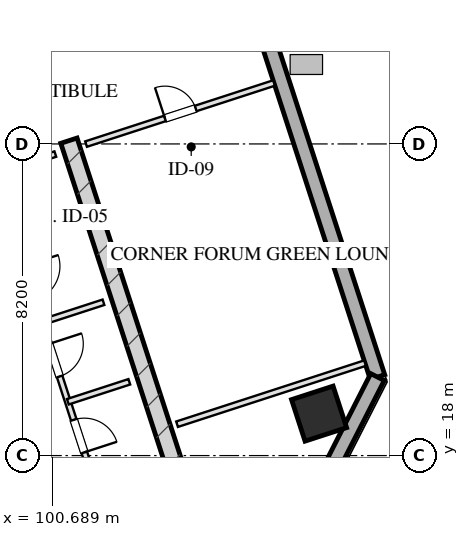
"""IFC4 building model, lengths in metres.
Left out: names, types, materials, properties, quantities, classifications, styles, units other than length and angle.
Written with IfcOpenShell. Run it as: python <this file> out.ifc"""

import sys

from ifc_helpers import new_model, si_unit, direction, frame, frame_2d, origin, origin_2d, place, context, subcontext, project, spatial, rectangle, hollow_rectangle, extrude, element, fill, save


model = new_model("IFC4")
c1 = context("Model", 3, precision=1e-05, world=origin(), true_north=direction((0.0, 1.0)))
c2 = subcontext(c1, "Body", "Model", "MODEL_VIEW")
j1 = project(units=[si_unit("LENGTHUNIT", "METRE"), si_unit("PLANEANGLEUNIT", "RADIAN")], contexts=[c1])
p1 = place(None, origin())
s1 = spatial("IfcSite", under=j1, at=p1, CompositionType="ELEMENT")
p2 = place(p1, origin())
s2 = spatial("IfcBuilding", under=s1, at=p2, CompositionType="ELEMENT")
p3 = place(p2, frame((0.0, 0.0, 205.85)))
s3 = spatial("IfcBuildingStorey", under=s2, at=p3, CompositionType="ELEMENT", Elevation=205.85)
p4 = place(p3, frame((101.128, 26.286, 0.0), z_axis=(0.0, 0.0, 1.0), x_axis=(0.309004419953, -0.951060601881, 0.0)))
e1 = element("IfcWall", 1, at=p4, inside=s3, PredefinedType="SHEAR", context=c2, shape_type="SweptSolid", body=[
    extrude(rectangle(XDim=9.33, YDim=0.45, at=frame_2d((4.665, 0.0))), origin(), (0.0, 0.0, 1.0), 3.45),
])
p5 = place(p3, frame((107.71, 19.104, 0.0), z_axis=(0.0, 0.0, 1.0), x_axis=(0.951056516295, 0.309016994375, 0.0)))
e2 = element("IfcColumn", 2, at=p5, inside=s3, PredefinedType="COLUMN", context=c2, shape_type="SweptSolid", body=[
    extrude(hollow_rectangle(XDim=1.15, YDim=1.15, WallThickness=0.04, at=origin_2d()), origin(), (0.0, 0.0, 1.0), 3.451),
])
p6 = place(p3, frame((97.382, 56.586, 0.0), z_axis=(0.0, 0.0, 1.0), x_axis=(0.309016491071, -0.951056679828, 0.0)))
e3 = element("IfcWall", 3, at=p6, inside=s3, PredefinedType="SOLIDWALL", context=c2, shape_type="SweptSolid", body=[
    extrude(rectangle(XDim=38.4, YDim=0.4, at=frame_2d((19.2, 0.0))), origin(), (0.0, 0.0, 1.0), 2.61),
])
p7 = place(p6, frame((24.55, 0.0, 0.75)))
e4 = element("IfcOpeningElement", 4, at=p7, cuts=e3, PredefinedType="OPENING", context=c2, shape_type="SweptSolid", body=[
    extrude(rectangle(XDim=2.1, YDim=1.46, at=frame_2d((1.05, 0.73))), frame((0.0, 0.21, 0.0), z_axis=(0.0, -1.0, 0.0), x_axis=(1.0, 0.0, 0.0)), (0.0, 0.0, 1.0), 0.42),
])
p8 = place(p6, frame((20.75, 0.0, 0.75)))
e5 = element("IfcOpeningElement", 5, at=p8, cuts=e3, PredefinedType="OPENING", context=c2, shape_type="SweptSolid", body=[
    extrude(rectangle(XDim=2.1, YDim=1.46, at=frame_2d((1.05, 0.73))), frame((0.0, 0.21, 0.0), z_axis=(0.0, -1.0, 0.0), x_axis=(1.0, 0.0, 0.0)), (0.0, 0.0, 1.0), 0.42),
])
p9 = place(p6, frame((16.05, 0.0, 0.0)))
e6 = element("IfcOpeningElement", 6, at=p9, cuts=e3, PredefinedType="OPENING", context=c2, shape_type="SweptSolid", body=[
    extrude(rectangle(XDim=1.1, YDim=2.15, at=frame_2d((0.55, 1.075))), frame((0.0, 0.21, 0.0), z_axis=(0.0, -1.0, 0.0), x_axis=(1.0, 0.0, 0.0)), (0.0, 0.0, 1.0), 0.42),
])
p10 = place(p3, frame((109.248, 20.066, 0.0), z_axis=(0.0, 0.0, 1.0), x_axis=(-0.453949291228, -0.891027519774, 0.0)))
e7 = element("IfcWall", 7, at=p10, inside=s3, PredefinedType="SOLIDWALL", context=c2, shape_type="SweptSolid", body=[
    extrude(rectangle(XDim=3.111, YDim=0.4, at=frame_2d((1.556, 0.0))), origin(), (0.0, 0.0, 1.0), 2.61),
])
p11 = place(p3, frame((97.727, 24.944, 0.0), z_axis=(0.0, 0.0, 1.0), x_axis=(0.951036872128, 0.309077446369, 0.0)))
e8 = element("IfcWall", 8, at=p11, inside=s3, PredefinedType="PARTITIONING", context=c2, shape_type="SweptSolid", body=[
    extrude(rectangle(XDim=3.2, YDim=0.15, at=frame_2d((1.6, 0.0))), origin(), (0.0, 0.0, 1.0), 3.175),
])
p12 = place(p11, frame((0.22, 0.0, 0.0)))
e9 = element("IfcOpeningElement", 9, at=p12, cuts=e8, PredefinedType="OPENING", context=c2, shape_type="SweptSolid", body=[
    extrude(rectangle(XDim=0.95, YDim=2.05, at=frame_2d((0.475, 1.025))), frame((0.0, 0.085, 0.0), z_axis=(0.0, -1.0, 0.0), x_axis=(1.0, 0.0, 0.0)), (0.0, 0.0, 1.0), 0.17),
])
p13 = place(p3, frame((99.153, 25.408, 0.0), z_axis=(0.0, 0.0, 1.0), x_axis=(0.309016001439, -0.951056838919, 0.0)))
e10 = element("IfcWall", 10, at=p13, inside=s3, PredefinedType="PARTITIONING", context=c2, shape_type="SweptSolid", body=[
    extrude(rectangle(XDim=8.43, YDim=0.15, at=frame_2d((4.215, 0.0))), origin(), (0.0, 0.0, 1.0), 3.175),
])
p14 = place(p13, frame((2.55, 0.0, 0.0)))
e11 = element("IfcOpeningElement", 11, at=p14, cuts=e10, PredefinedType="OPENING", context=c2, shape_type="SweptSolid", body=[
    extrude(rectangle(XDim=0.95, YDim=2.05, at=frame_2d((0.475, 1.025))), frame((0.0, 0.085, 0.0), z_axis=(0.0, -1.0, 0.0), x_axis=(1.0, 0.0, 0.0)), (0.0, 0.0, 1.0), 0.17),
])
p15 = place(p13, frame((4.7, 0.0, 0.0)))
e12 = element("IfcOpeningElement", 12, at=p15, cuts=e10, PredefinedType="OPENING", context=c2, shape_type="SweptSolid", body=[
    extrude(rectangle(XDim=0.9, YDim=2.05, at=frame_2d((0.45, 1.025))), frame((0.0, 0.085, 0.0), z_axis=(0.0, -1.0, 0.0), x_axis=(1.0, 0.0, 0.0)), (0.0, 0.0, 1.0), 0.17),
])
p16 = place(p13, frame((6.8, 0.0, 0.0)))
e13 = element("IfcOpeningElement", 13, at=p16, cuts=e10, PredefinedType="OPENING", context=c2, shape_type="SweptSolid", body=[
    extrude(rectangle(XDim=0.9, YDim=2.05, at=frame_2d((0.45, 1.025))), frame((0.0, 0.085, 0.0), z_axis=(0.0, -1.0, 0.0), x_axis=(1.0, 0.0, 0.0)), (0.0, 0.0, 1.0), 0.17),
])
p17 = place(p3, frame((100.42, 21.509, 0.0), z_axis=(0.0, 0.0, 1.0), x_axis=(0.951040401051, 0.309066587596, 0.0)))
e14 = element("IfcWall", 14, at=p17, inside=s3, PredefinedType="PARTITIONING", context=c2, shape_type="SweptSolid", body=[
    extrude(rectangle(XDim=1.7, YDim=0.15, at=frame_2d((0.85, 0.0))), origin(), (0.0, 0.0, 1.0), 3.175),
])
p18 = place(p3, frame((101.1, 19.416, 0.0), z_axis=(0.0, 0.0, 1.0), x_axis=(0.951054116971, 0.309024378638, 0.0)))
e15 = element("IfcWall", 15, at=p18, inside=s3, PredefinedType="PARTITIONING", context=c2, shape_type="SweptSolid", body=[
    extrude(rectangle(XDim=1.7, YDim=0.15, at=frame_2d((0.85, 0.0))), origin(), (0.0, 0.0, 1.0), 3.175),
])
p19 = place(p3, frame((103.973, 18.825, 0.0), z_axis=(0.0, 0.0, 1.0), x_axis=(0.951055112834, 0.309021313752, 0.0)))
e16 = element("IfcWall", 16, at=p19, inside=s3, PredefinedType="PARTITIONING", context=c2, shape_type="SweptSolid", body=[
    extrude(rectangle(XDim=5.2, YDim=0.15, at=frame_2d((2.6, 0.0))), origin(), (0.0, 0.0, 1.0), 3.175),
])
p20 = place(p3, frame((101.578, 26.196, 0.0), z_axis=(0.0, 0.0, 1.0), x_axis=(0.951064427824, 0.308992644131, 0.0)))
e17 = element("IfcWall", 17, at=p20, inside=s3, PredefinedType="PARTITIONING", context=c2, shape_type="SweptSolid", body=[
    extrude(rectangle(XDim=5.2, YDim=0.15, at=frame_2d((2.6, 0.0))), origin(), (0.0, 0.0, 1.0), 3.175),
])
p21 = place(p20, frame((2.184, 0.0, 0.0)))
e18 = element("IfcOpeningElement", 18, at=p21, cuts=e17, PredefinedType="OPENING", context=c2, shape_type="SweptSolid", body=[
    extrude(rectangle(XDim=0.85, YDim=2.05, at=frame_2d((0.425, 1.025))), frame((0.0, 0.085, 0.0), z_axis=(0.0, -1.0, 0.0), x_axis=(1.0, 0.0, 0.0)), (0.0, 0.0, 1.0), 0.17),
])
p22 = place(p15, origin())
e19 = element("IfcDoor", 19, at=p22, inside=s3, OperationType="SINGLE_SWING_LEFT", PredefinedType="DOOR", context=c2, shape_type="SweptSolid", body=[
    extrude(rectangle(XDim=0.9, YDim=2.05, at=frame_2d((0.45, 1.025))), frame((0.0, 0.025, 0.0), z_axis=(0.0, -1.0, 0.0), x_axis=(1.0, 0.0, 0.0)), (0.0, 0.0, 1.0), 0.05),
])
fill(e12, e19)
p23 = place(p16, origin())
e20 = element("IfcDoor", 20, at=p23, inside=s3, OperationType="SINGLE_SWING_RIGHT", PredefinedType="DOOR", context=c2, shape_type="SweptSolid", body=[
    extrude(rectangle(XDim=0.9, YDim=2.05, at=frame_2d((0.45, 1.025))), frame((0.0, 0.025, 0.0), z_axis=(0.0, -1.0, 0.0), x_axis=(1.0, 0.0, 0.0)), (0.0, 0.0, 1.0), 0.05),
])
fill(e13, e20)
p24 = place(p21, origin())
e21 = element("IfcDoor", 21, at=p24, inside=s3, OperationType="SINGLE_SWING_LEFT", PredefinedType="DOOR", context=c2, shape_type="SweptSolid", body=[
    extrude(rectangle(XDim=0.85, YDim=2.05, at=frame_2d((0.425, 1.025))), frame((0.0, 0.025, 0.0), z_axis=(0.0, -1.0, 0.0), x_axis=(1.0, 0.0, 0.0)), (0.0, 0.0, 1.0), 0.05),
])
fill(e18, e21)
save(model, sys.argv[1])
